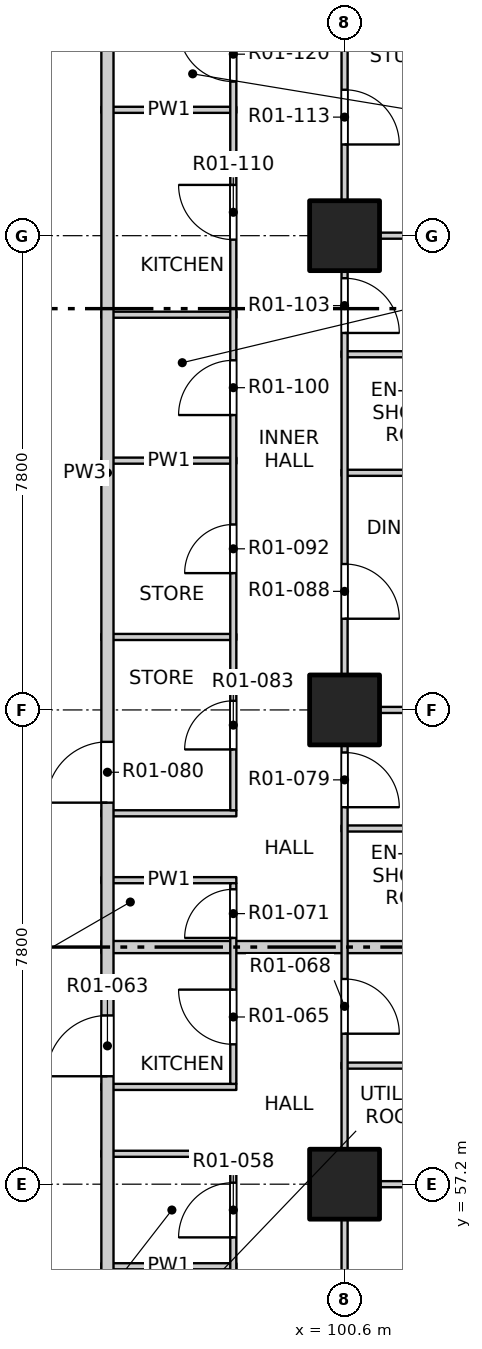
"""IFC4 building model, lengths in metres.
Left out: names, types, materials, properties, quantities, classifications, styles, units other than length and angle.
Written with IfcOpenShell. Run it as: python <this file> out.ifc"""

import sys

from ifc_helpers import new_model, si_unit, direction, frame, frame_2d, origin, origin_2d, place, context, subcontext, project, spatial, rectangle, extrude, element, fill, save


model = new_model("IFC4")
c1 = context("Model", 3, precision=1e-05, world=origin(), true_north=direction((0.0, 1.0)))
c2 = subcontext(c1, "Body", "Model", "MODEL_VIEW")
j1 = project(units=[si_unit("LENGTHUNIT", "METRE"), si_unit("PLANEANGLEUNIT", "RADIAN")], contexts=[c1])
p1 = place(None, origin())
s1 = spatial("IfcSite", under=j1, at=p1, CompositionType="ELEMENT")
p2 = place(p1, origin())
s2 = spatial("IfcBuilding", under=s1, at=p2, CompositionType="ELEMENT")
p3 = place(p2, frame((0.0, 0.0, 19.5)))
s3 = spatial("IfcBuildingStorey", under=s2, at=p3, CompositionType="ELEMENT", Elevation=19.5)
for number, where, z_axis, x_axis in (
    (1, (100.6, 57.2, -0.25), (0.0, 0.0, 1.0), (1.0, 0.0, 0.0)),
    (2, (100.6, 65.0, -0.25), (0.0, 0.0, 1.0), (1.0, 0.0, 0.0)),
    (3, (100.6, 72.8, -0.25), (0.0, 0.0, 1.0), (1.0, 0.0, 0.0)),
):
    element("IfcColumn", number, at=place(p3, frame(where, z_axis=z_axis, x_axis=x_axis)), inside=s3, PredefinedType="COLUMN", context=c2, shape_type="SweptSolid", body=[
        extrude(rectangle(XDim=1.15, YDim=1.15, at=origin_2d()), origin(), (0.0, 0.0, 1.0), 3.4),
    ])
p4 = place(p3, frame((96.6, 55.85, 0.0), z_axis=(0.0, 0.0, 1.0), x_axis=(1.0, 0.0, 0.0)))
e4 = element("IfcWall", 4, at=p4, inside=s3, PredefinedType="PARTITIONING", context=c2, shape_type="SweptSolid", body=[
    extrude(rectangle(XDim=2.22, YDim=0.1, at=frame_2d((1.11, 0.0))), origin(), (0.0, 0.0, 1.0), 3.15),
])
p5 = place(p3, frame((100.55, 57.2, 0.0), z_axis=(0.0, 0.0, 1.0), x_axis=(1.0, 0.0, 0.0)))
e5 = element("IfcWall", 5, at=p5, inside=s3, PredefinedType="PARTITIONING", context=c2, shape_type="SweptSolid", body=[
    extrude(rectangle(XDim=7.55, YDim=0.1, at=frame_2d((3.775, 0.0))), origin(), (0.0, 0.0, 1.0), 2.55),
])
for number, where, z_axis, x_axis in (
    (6, (96.6, 57.7, 0.0), (0.0, 0.0, 1.0), (1.0, 0.0, 0.0)),
    (7, (96.6, 58.8, 0.0), (0.0, 0.0, 1.0), (1.0, 0.0, 0.0)),
):
    element("IfcWall", number, at=place(p3, frame(where, z_axis=z_axis, x_axis=x_axis)), inside=s3, PredefinedType="PARTITIONING", context=c2, shape_type="SweptSolid", body=[
        extrude(rectangle(XDim=2.22, YDim=0.1, at=frame_2d((1.11, 0.0))), origin(), (0.0, 0.0, 1.0), 3.15),
    ])
p6 = place(p3, frame((100.55, 59.15, 0.0), z_axis=(0.0, 0.0, 1.0), x_axis=(1.0, 0.0, 0.0)))
e8 = element("IfcWall", 8, at=p6, inside=s3, PredefinedType="PARTITIONING", context=c2, shape_type="SweptSolid", body=[
    extrude(rectangle(XDim=3.55, YDim=0.1, at=frame_2d((1.775, 0.0))), origin(), (0.0, 0.0, 1.0), 3.15),
])
p7 = place(p3, frame((96.6, 61.1, 0.0), z_axis=(0.0, 0.0, 1.0), x_axis=(1.0, 0.0, 0.0)))
e9 = element("IfcWall", 9, at=p7, inside=s3, PredefinedType="PARTITIONING", context=c2, shape_type="SweptSolid", body=[
    extrude(rectangle(XDim=11.5, YDim=0.2, at=frame_2d((5.75, 0.0))), origin(), (0.0, 0.0, 1.0), 3.15),
])
p8 = place(p3, frame((96.6, 62.2, 0.0), z_axis=(0.0, 0.0, 1.0), x_axis=(1.0, 0.0, 0.0)))
e10 = element("IfcWall", 10, at=p8, inside=s3, PredefinedType="PARTITIONING", context=c2, shape_type="SweptSolid", body=[
    extrude(rectangle(XDim=2.22, YDim=0.1, at=frame_2d((1.11, 0.0))), origin(), (0.0, 0.0, 1.0), 3.15),
])
p9 = place(p3, frame((100.55, 63.05, 0.0), z_axis=(0.0, 0.0, 1.0), x_axis=(1.0, 0.0, 0.0)))
e11 = element("IfcWall", 11, at=p9, inside=s3, PredefinedType="PARTITIONING", context=c2, shape_type="SweptSolid", body=[
    extrude(rectangle(XDim=3.7, YDim=0.1, at=frame_2d((1.85, 0.0))), origin(), (0.0, 0.0, 1.0), 3.15),
])
p10 = place(p3, frame((96.6, 63.3, 0.0), z_axis=(0.0, 0.0, 1.0), x_axis=(1.0, 0.0, 0.0)))
e12 = element("IfcWall", 12, at=p10, inside=s3, PredefinedType="PARTITIONING", context=c2, shape_type="SweptSolid", body=[
    extrude(rectangle(XDim=2.22, YDim=0.1, at=frame_2d((1.11, 0.0))), origin(), (0.0, 0.0, 1.0), 3.15),
])
p11 = place(p3, frame((100.55, 65.0, 0.0), z_axis=(0.0, 0.0, 1.0), x_axis=(1.0, 0.0, 0.0)))
e13 = element("IfcWall", 13, at=p11, inside=s3, PredefinedType="PARTITIONING", context=c2, shape_type="SweptSolid", body=[
    extrude(rectangle(XDim=7.55, YDim=0.1, at=frame_2d((3.775, 0.0))), origin(), (0.0, 0.0, 1.0), 2.55),
])
p12 = place(p3, frame((96.6, 66.2, 0.0), z_axis=(0.0, 0.0, 1.0), x_axis=(1.0, 0.0, 0.0)))
e14 = element("IfcWall", 14, at=p12, inside=s3, PredefinedType="PARTITIONING", context=c2, shape_type="SweptSolid", body=[
    extrude(rectangle(XDim=2.22, YDim=0.1, at=frame_2d((1.11, 0.0))), origin(), (0.0, 0.0, 1.0), 3.15),
])
p13 = place(p3, frame((100.55, 68.9, 0.0), z_axis=(0.0, 0.0, 1.0), x_axis=(1.0, 0.0, 0.0)))
e15 = element("IfcWall", 15, at=p13, inside=s3, PredefinedType="PARTITIONING", context=c2, shape_type="SweptSolid", body=[
    extrude(rectangle(XDim=7.55, YDim=0.1, at=frame_2d((3.775, 0.0))), origin(), (0.0, 0.0, 1.0), 3.15),
])
p14 = place(p3, frame((96.6, 69.1, 0.0), z_axis=(0.0, 0.0, 1.0), x_axis=(1.0, 0.0, 0.0)))
e16 = element("IfcWall", 16, at=p14, inside=s3, PredefinedType="PARTITIONING", context=c2, shape_type="SweptSolid", body=[
    extrude(rectangle(XDim=2.22, YDim=0.1, at=frame_2d((1.11, 0.0))), origin(), (0.0, 0.0, 1.0), 3.15),
])
p15 = place(p3, frame((100.55, 70.85, 0.0), z_axis=(0.0, 0.0, 1.0), x_axis=(1.0, 0.0, 0.0)))
e17 = element("IfcWall", 17, at=p15, inside=s3, PredefinedType="PARTITIONING", context=c2, shape_type="SweptSolid", body=[
    extrude(rectangle(XDim=3.7, YDim=0.1, at=frame_2d((1.85, 0.0))), origin(), (0.0, 0.0, 1.0), 3.15),
])
p16 = place(p3, frame((96.6, 71.5, 0.0), z_axis=(0.0, 0.0, 1.0), x_axis=(1.0, 0.0, 0.0)))
e18 = element("IfcWall", 18, at=p16, inside=s3, PredefinedType="PARTITIONING", context=c2, shape_type="SweptSolid", body=[
    extrude(rectangle(XDim=2.22, YDim=0.1, at=frame_2d((1.11, 0.0))), origin(), (0.0, 0.0, 1.0), 3.15),
])
p17 = place(p3, frame((100.55, 72.8, 0.0), z_axis=(0.0, 0.0, 1.0), x_axis=(1.0, 0.0, 0.0)))
e19 = element("IfcWall", 19, at=p17, inside=s3, PredefinedType="PARTITIONING", context=c2, shape_type="SweptSolid", body=[
    extrude(rectangle(XDim=7.55, YDim=0.1, at=frame_2d((3.775, 0.0))), origin(), (0.0, 0.0, 1.0), 2.55),
])
p18 = place(p3, frame((96.6, 74.87, 0.0), z_axis=(0.0, 0.0, 1.0), x_axis=(1.0, 0.0, 0.0)))
e20 = element("IfcWall", 20, at=p18, inside=s3, PredefinedType="PARTITIONING", context=c2, shape_type="SweptSolid", body=[
    extrude(rectangle(XDim=2.22, YDim=0.1, at=frame_2d((1.11, 0.0))), origin(), (0.0, 0.0, 1.0), 3.15),
])
p19 = place(p3, frame((96.7, 53.4, 0.0), z_axis=(0.0, 0.0, 1.0), x_axis=(0.0, 1.0, 0.0)))
e21 = element("IfcWall", 21, at=p19, inside=s3, PredefinedType="PARTITIONING", context=c2, shape_type="SweptSolid", body=[
    extrude(rectangle(XDim=31.0, YDim=0.2, at=frame_2d((15.5, 0.0))), origin(), (0.0, 0.0, 1.0), 3.15),
])
p20 = place(p19, frame((5.575, 0.0, 0.0)))
e22 = element("IfcOpeningElement", 22, at=p20, cuts=e21, PredefinedType="OPENING", context=c2, shape_type="SweptSolid", body=[
    extrude(rectangle(XDim=1.0, YDim=2.1, at=frame_2d((0.5, 1.05))), frame((0.0, 0.11, 0.0), z_axis=(0.0, -1.0, 0.0), x_axis=(1.0, 0.0, 0.0)), (0.0, 0.0, 1.0), 0.22),
])
p21 = place(p19, frame((10.075, 0.0, 0.0)))
e23 = element("IfcOpeningElement", 23, at=p21, cuts=e21, PredefinedType="OPENING", context=c2, shape_type="SweptSolid", body=[
    extrude(rectangle(XDim=1.0, YDim=2.1, at=frame_2d((0.5, 1.05))), frame((0.0, 0.11, 0.0), z_axis=(0.0, -1.0, 0.0), x_axis=(1.0, 0.0, 0.0)), (0.0, 0.0, 1.0), 0.22),
])
p22 = place(p19, frame((28.975, 0.0, 0.0)))
e24 = element("IfcOpeningElement", 24, at=p22, cuts=e21, PredefinedType="OPENING", context=c2, shape_type="SweptSolid", body=[
    extrude(rectangle(XDim=1.0, YDim=2.1, at=frame_2d((0.5, 1.05))), frame((0.0, 0.11, 0.0), z_axis=(0.0, -1.0, 0.0), x_axis=(1.0, 0.0, 0.0)), (0.0, 0.0, 1.0), 0.22),
])
p23 = place(p3, frame((98.77, 45.55, 0.0), z_axis=(0.0, 0.0, 1.0), x_axis=(0.0, 1.0, 0.0)))
e25 = element("IfcWall", 25, at=p23, inside=s3, PredefinedType="PARTITIONING", context=c2, shape_type="SweptSolid", body=[
    extrude(rectangle(XDim=12.1, YDim=0.1, at=frame_2d((6.05, 0.0))), origin(), (0.0, 0.0, 1.0), 3.15),
])
p24 = place(p23, frame((0.7, 0.0, 0.0)))
e26 = element("IfcOpeningElement", 26, at=p24, cuts=e25, PredefinedType="OPENING", context=c2, shape_type="SweptSolid", body=[
    extrude(rectangle(XDim=0.9, YDim=2.1, at=frame_2d((0.45, 1.05))), frame((0.0, 0.06, 0.0), z_axis=(0.0, -1.0, 0.0), x_axis=(1.0, 0.0, 0.0)), (0.0, 0.0, 1.0), 0.12),
])
p25 = place(p23, frame((3.325, 0.0, 0.0)))
e27 = element("IfcOpeningElement", 27, at=p25, cuts=e25, PredefinedType="OPENING", context=c2, shape_type="SweptSolid", body=[
    extrude(rectangle(XDim=0.8, YDim=2.1, at=frame_2d((0.4, 1.05))), frame((0.0, 0.06, 0.0), z_axis=(0.0, -1.0, 0.0), x_axis=(1.0, 0.0, 0.0)), (0.0, 0.0, 1.0), 0.12),
])
p26 = place(p23, frame((6.15, 0.0, 0.0)))
e28 = element("IfcOpeningElement", 28, at=p26, cuts=e25, PredefinedType="OPENING", context=c2, shape_type="SweptSolid", body=[
    extrude(rectangle(XDim=0.8, YDim=2.1, at=frame_2d((0.4, 1.05))), frame((0.0, 0.06, 0.0), z_axis=(0.0, -1.0, 0.0), x_axis=(1.0, 0.0, 0.0)), (0.0, 0.0, 1.0), 0.12),
])
p27 = place(p23, frame((8.75, 0.0, 0.0)))
e29 = element("IfcOpeningElement", 29, at=p27, cuts=e25, PredefinedType="OPENING", context=c2, shape_type="SweptSolid", body=[
    extrude(rectangle(XDim=0.8, YDim=2.1, at=frame_2d((0.4, 1.05))), frame((0.0, 0.06, 0.0), z_axis=(0.0, -1.0, 0.0), x_axis=(1.0, 0.0, 0.0)), (0.0, 0.0, 1.0), 0.12),
])
p28 = place(p23, frame((10.775, 0.0, 0.0)))
e30 = element("IfcOpeningElement", 30, at=p28, cuts=e25, PredefinedType="OPENING", context=c2, shape_type="SweptSolid", body=[
    extrude(rectangle(XDim=0.9, YDim=2.1, at=frame_2d((0.45, 1.05))), frame((0.0, 0.06, 0.0), z_axis=(0.0, -1.0, 0.0), x_axis=(1.0, 0.0, 0.0)), (0.0, 0.0, 1.0), 0.12),
])
p29 = place(p3, frame((98.77, 58.85, 0.0), z_axis=(0.0, 0.0, 1.0), x_axis=(0.0, 1.0, 0.0)))
e31 = element("IfcWall", 31, at=p29, inside=s3, PredefinedType="PARTITIONING", context=c2, shape_type="SweptSolid", body=[
    extrude(rectangle(XDim=3.3, YDim=0.1, at=frame_2d((1.65, 0.0))), origin(), (0.0, 0.0, 1.0), 3.15),
])
p30 = place(p29, frame((0.65, 0.0, 0.0)))
e32 = element("IfcOpeningElement", 32, at=p30, cuts=e31, PredefinedType="OPENING", context=c2, shape_type="SweptSolid", body=[
    extrude(rectangle(XDim=0.9, YDim=2.1, at=frame_2d((0.45, 1.05))), frame((0.0, 0.06, 0.0), z_axis=(0.0, -1.0, 0.0), x_axis=(1.0, 0.0, 0.0)), (0.0, 0.0, 1.0), 0.12),
])
p31 = place(p29, frame((2.4, 0.0, 0.0)))
e33 = element("IfcOpeningElement", 33, at=p31, cuts=e31, PredefinedType="OPENING", context=c2, shape_type="SweptSolid", body=[
    extrude(rectangle(XDim=0.8, YDim=2.1, at=frame_2d((0.4, 1.05))), frame((0.0, 0.06, 0.0), z_axis=(0.0, -1.0, 0.0), x_axis=(1.0, 0.0, 0.0)), (0.0, 0.0, 1.0), 0.12),
])
p32 = place(p3, frame((98.77, 63.35, 0.0), z_axis=(0.0, 0.0, 1.0), x_axis=(0.0, 1.0, 0.0)))
e34 = element("IfcWall", 34, at=p32, inside=s3, PredefinedType="PARTITIONING", context=c2, shape_type="SweptSolid", body=[
    extrude(rectangle(XDim=17.7, YDim=0.1, at=frame_2d((8.85, 0.0))), origin(), (0.0, 0.0, 1.0), 3.15),
])
p33 = place(p32, frame((1.0, 0.0, 0.0)))
e35 = element("IfcOpeningElement", 35, at=p33, cuts=e34, PredefinedType="OPENING", context=c2, shape_type="SweptSolid", body=[
    extrude(rectangle(XDim=0.8, YDim=2.1, at=frame_2d((0.4, 1.05))), frame((0.0, 0.06, 0.0), z_axis=(0.0, -1.0, 0.0), x_axis=(1.0, 0.0, 0.0)), (0.0, 0.0, 1.0), 0.12),
])
p34 = place(p32, frame((3.9, 0.0, 0.0)))
e36 = element("IfcOpeningElement", 36, at=p34, cuts=e34, PredefinedType="OPENING", context=c2, shape_type="SweptSolid", body=[
    extrude(rectangle(XDim=0.8, YDim=2.1, at=frame_2d((0.4, 1.05))), frame((0.0, 0.06, 0.0), z_axis=(0.0, -1.0, 0.0), x_axis=(1.0, 0.0, 0.0)), (0.0, 0.0, 1.0), 0.12),
])
p35 = place(p32, frame((6.5, 0.0, 0.0)))
e37 = element("IfcOpeningElement", 37, at=p35, cuts=e34, PredefinedType="OPENING", context=c2, shape_type="SweptSolid", body=[
    extrude(rectangle(XDim=0.9, YDim=2.1, at=frame_2d((0.45, 1.05))), frame((0.0, 0.06, 0.0), z_axis=(0.0, -1.0, 0.0), x_axis=(1.0, 0.0, 0.0)), (0.0, 0.0, 1.0), 0.12),
])
p36 = place(p32, frame((9.385, 0.0, 0.0)))
e38 = element("IfcOpeningElement", 38, at=p36, cuts=e34, PredefinedType="OPENING", context=c2, shape_type="SweptSolid", body=[
    extrude(rectangle(XDim=0.9, YDim=2.1, at=frame_2d((0.45, 1.05))), frame((0.0, 0.06, 0.0), z_axis=(0.0, -1.0, 0.0), x_axis=(1.0, 0.0, 0.0)), (0.0, 0.0, 1.0), 0.12),
])
p37 = place(p32, frame((11.985, 0.0, 0.0)))
e39 = element("IfcOpeningElement", 39, at=p37, cuts=e34, PredefinedType="OPENING", context=c2, shape_type="SweptSolid", body=[
    extrude(rectangle(XDim=0.9, YDim=2.1, at=frame_2d((0.45, 1.05))), frame((0.0, 0.06, 0.0), z_axis=(0.0, -1.0, 0.0), x_axis=(1.0, 0.0, 0.0)), (0.0, 0.0, 1.0), 0.12),
])
p38 = place(p32, frame((14.025, 0.0, 0.0)))
e40 = element("IfcOpeningElement", 40, at=p38, cuts=e34, PredefinedType="OPENING", context=c2, shape_type="SweptSolid", body=[
    extrude(rectangle(XDim=0.8, YDim=2.1, at=frame_2d((0.4, 1.05))), frame((0.0, 0.06, 0.0), z_axis=(0.0, -1.0, 0.0), x_axis=(1.0, 0.0, 0.0)), (0.0, 0.0, 1.0), 0.12),
])
p39 = place(p32, frame((16.175, 0.0, 0.0)))
e41 = element("IfcOpeningElement", 41, at=p39, cuts=e34, PredefinedType="OPENING", context=c2, shape_type="SweptSolid", body=[
    extrude(rectangle(XDim=0.9, YDim=2.1, at=frame_2d((0.45, 1.05))), frame((0.0, 0.06, 0.0), z_axis=(0.0, -1.0, 0.0), x_axis=(1.0, 0.0, 0.0)), (0.0, 0.0, 1.0), 0.12),
])
p40 = place(p3, frame((100.6, 49.4, 0.0), z_axis=(0.0, 0.0, 1.0), x_axis=(0.0, 1.0, 0.0)))
e42 = element("IfcWall", 42, at=p40, inside=s3, PredefinedType="PARTITIONING", context=c2, shape_type="SweptSolid", body=[
    extrude(rectangle(XDim=31.2, YDim=0.1, at=frame_2d((15.6, 0.0))), origin(), (0.0, 0.0, 1.0), 3.15),
])
p41 = place(p40, frame((1.5, 0.0, 0.0)))
e43 = element("IfcOpeningElement", 43, at=p41, cuts=e42, PredefinedType="OPENING", context=c2, shape_type="SweptSolid", body=[
    extrude(rectangle(XDim=0.9, YDim=2.1, at=frame_2d((0.45, 1.05))), frame((0.0, 0.06, 0.0), z_axis=(0.0, -1.0, 0.0), x_axis=(1.0, 0.0, 0.0)), (0.0, 0.0, 1.0), 0.12),
])
p42 = place(p40, frame((5.4, 0.0, 0.0)))
e44 = element("IfcOpeningElement", 44, at=p42, cuts=e42, PredefinedType="OPENING", context=c2, shape_type="SweptSolid", body=[
    extrude(rectangle(XDim=0.9, YDim=2.1, at=frame_2d((0.45, 1.05))), frame((0.0, 0.06, 0.0), z_axis=(0.0, -1.0, 0.0), x_axis=(1.0, 0.0, 0.0)), (0.0, 0.0, 1.0), 0.12),
])
p43 = place(p40, frame((10.275, 0.0, 0.0)))
e45 = element("IfcOpeningElement", 45, at=p43, cuts=e42, PredefinedType="OPENING", context=c2, shape_type="SweptSolid", body=[
    extrude(rectangle(XDim=0.9, YDim=2.1, at=frame_2d((0.45, 1.05))), frame((0.0, 0.06, 0.0), z_axis=(0.0, -1.0, 0.0), x_axis=(1.0, 0.0, 0.0)), (0.0, 0.0, 1.0), 0.12),
])
p44 = place(p40, frame((14.0, 0.0, 0.0)))
e46 = element("IfcOpeningElement", 46, at=p44, cuts=e42, PredefinedType="OPENING", context=c2, shape_type="SweptSolid", body=[
    extrude(rectangle(XDim=0.9, YDim=2.1, at=frame_2d((0.45, 1.05))), frame((0.0, 0.06, 0.0), z_axis=(0.0, -1.0, 0.0), x_axis=(1.0, 0.0, 0.0)), (0.0, 0.0, 1.0), 0.12),
])
p45 = place(p40, frame((17.1, 0.0, 0.0)))
e47 = element("IfcOpeningElement", 47, at=p45, cuts=e42, PredefinedType="OPENING", context=c2, shape_type="SweptSolid", body=[
    extrude(rectangle(XDim=0.9, YDim=2.1, at=frame_2d((0.45, 1.05))), frame((0.0, 0.06, 0.0), z_axis=(0.0, -1.0, 0.0), x_axis=(1.0, 0.0, 0.0)), (0.0, 0.0, 1.0), 0.12),
])
p46 = place(p40, frame((21.8, 0.0, 0.0)))
e48 = element("IfcOpeningElement", 48, at=p46, cuts=e42, PredefinedType="OPENING", context=c2, shape_type="SweptSolid", body=[
    extrude(rectangle(XDim=0.9, YDim=2.1, at=frame_2d((0.45, 1.05))), frame((0.0, 0.06, 0.0), z_axis=(0.0, -1.0, 0.0), x_axis=(1.0, 0.0, 0.0)), (0.0, 0.0, 1.0), 0.12),
])
p47 = place(p40, frame((24.9, 0.0, 0.0)))
e49 = element("IfcOpeningElement", 49, at=p47, cuts=e42, PredefinedType="OPENING", context=c2, shape_type="SweptSolid", body=[
    extrude(rectangle(XDim=0.9, YDim=2.1, at=frame_2d((0.45, 1.05))), frame((0.0, 0.06, 0.0), z_axis=(0.0, -1.0, 0.0), x_axis=(1.0, 0.0, 0.0)), (0.0, 0.0, 1.0), 0.12),
])
p48 = place(p40, frame((28.8, 0.0, 0.0)))
e50 = element("IfcOpeningElement", 50, at=p48, cuts=e42, PredefinedType="OPENING", context=c2, shape_type="SweptSolid", body=[
    extrude(rectangle(XDim=0.9, YDim=2.1, at=frame_2d((0.45, 1.05))), frame((0.0, 0.06, 0.0), z_axis=(0.0, -1.0, 0.0), x_axis=(1.0, 0.0, 0.0)), (0.0, 0.0, 1.0), 0.12),
])
p49 = place(p28, origin())
e51 = element("IfcDoor", 51, at=p49, inside=s3, OperationType="SINGLE_SWING_LEFT", PredefinedType="DOOR", context=c2, shape_type="SweptSolid", body=[
    extrude(rectangle(XDim=0.9, YDim=2.1, at=frame_2d((0.45, 1.05))), frame((0.0, 0.025, 0.0), z_axis=(0.0, -1.0, 0.0), x_axis=(1.0, 0.0, 0.0)), (0.0, 0.0, 1.0), 0.05),
])
fill(e30, e51)
p50 = place(p20, origin())
e52 = element("IfcDoor", 52, at=p50, inside=s3, OperationType="SINGLE_SWING_LEFT", PredefinedType="DOOR", context=c2, shape_type="SweptSolid", body=[
    extrude(rectangle(XDim=1.0, YDim=2.1, at=frame_2d((0.5, 1.05))), frame((0.0, 0.025, 0.0), z_axis=(0.0, -1.0, 0.0), x_axis=(1.0, 0.0, 0.0)), (0.0, 0.0, 1.0), 0.05),
])
fill(e22, e52)
p51 = place(p30, origin())
e53 = element("IfcDoor", 53, at=p51, inside=s3, OperationType="SINGLE_SWING_RIGHT", PredefinedType="DOOR", context=c2, shape_type="SweptSolid", body=[
    extrude(rectangle(XDim=0.9, YDim=2.1, at=frame_2d((0.45, 1.05))), frame((0.0, 0.025, 0.0), z_axis=(0.0, -1.0, 0.0), x_axis=(1.0, 0.0, 0.0)), (0.0, 0.0, 1.0), 0.05),
])
fill(e32, e53)
p52 = place(p43, origin())
e54 = element("IfcDoor", 54, at=p52, inside=s3, OperationType="SINGLE_SWING_RIGHT", PredefinedType="DOOR", context=c2, shape_type="SweptSolid", body=[
    extrude(rectangle(XDim=0.9, YDim=2.1, at=frame_2d((0.45, 1.05))), frame((0.0, 0.025, 0.0), z_axis=(0.0, -1.0, 0.0), x_axis=(1.0, 0.0, 0.0)), (0.0, 0.0, 1.0), 0.05),
])
fill(e45, e54)
p53 = place(p31, origin())
e55 = element("IfcDoor", 55, at=p53, inside=s3, OperationType="SINGLE_SWING_LEFT", PredefinedType="DOOR", context=c2, shape_type="SweptSolid", body=[
    extrude(rectangle(XDim=0.8, YDim=2.1, at=frame_2d((0.4, 1.05))), frame((0.0, 0.025, 0.0), z_axis=(0.0, -1.0, 0.0), x_axis=(1.0, 0.0, 0.0)), (0.0, 0.0, 1.0), 0.05),
])
fill(e33, e55)
p54 = place(p44, origin())
e56 = element("IfcDoor", 56, at=p54, inside=s3, OperationType="SINGLE_SWING_RIGHT", PredefinedType="DOOR", context=c2, shape_type="SweptSolid", body=[
    extrude(rectangle(XDim=0.9, YDim=2.1, at=frame_2d((0.45, 1.05))), frame((0.0, 0.025, 0.0), z_axis=(0.0, -1.0, 0.0), x_axis=(1.0, 0.0, 0.0)), (0.0, 0.0, 1.0), 0.05),
])
fill(e46, e56)
p55 = place(p21, origin())
e57 = element("IfcDoor", 57, at=p55, inside=s3, OperationType="SINGLE_SWING_LEFT", PredefinedType="DOOR", context=c2, shape_type="SweptSolid", body=[
    extrude(rectangle(XDim=1.0, YDim=2.1, at=frame_2d((0.5, 1.05))), frame((0.0, 0.025, 0.0), z_axis=(0.0, -1.0, 0.0), x_axis=(1.0, 0.0, 0.0)), (0.0, 0.0, 1.0), 0.05),
])
fill(e23, e57)
p56 = place(p33, origin())
e58 = element("IfcDoor", 58, at=p56, inside=s3, OperationType="SINGLE_SWING_LEFT", PredefinedType="DOOR", context=c2, shape_type="SweptSolid", body=[
    extrude(rectangle(XDim=0.8, YDim=2.1, at=frame_2d((0.4, 1.05))), frame((0.0, 0.025, 0.0), z_axis=(0.0, -1.0, 0.0), x_axis=(1.0, 0.0, 0.0)), (0.0, 0.0, 1.0), 0.05),
])
fill(e35, e58)
p57 = place(p45, origin())
e59 = element("IfcDoor", 59, at=p57, inside=s3, OperationType="SINGLE_SWING_RIGHT", PredefinedType="DOOR", context=c2, shape_type="SweptSolid", body=[
    extrude(rectangle(XDim=0.9, YDim=2.1, at=frame_2d((0.45, 1.05))), frame((0.0, 0.025, 0.0), z_axis=(0.0, -1.0, 0.0), x_axis=(1.0, 0.0, 0.0)), (0.0, 0.0, 1.0), 0.05),
])
fill(e47, e59)
p58 = place(p34, origin())
e60 = element("IfcDoor", 60, at=p58, inside=s3, OperationType="SINGLE_SWING_LEFT", PredefinedType="DOOR", context=c2, shape_type="SweptSolid", body=[
    extrude(rectangle(XDim=0.8, YDim=2.1, at=frame_2d((0.4, 1.05))), frame((0.0, 0.025, 0.0), z_axis=(0.0, -1.0, 0.0), x_axis=(1.0, 0.0, 0.0)), (0.0, 0.0, 1.0), 0.05),
])
fill(e36, e60)
p59 = place(p35, origin())
e61 = element("IfcDoor", 61, at=p59, inside=s3, OperationType="SINGLE_SWING_LEFT", PredefinedType="DOOR", context=c2, shape_type="SweptSolid", body=[
    extrude(rectangle(XDim=0.9, YDim=2.1, at=frame_2d((0.45, 1.05))), frame((0.0, 0.025, 0.0), z_axis=(0.0, -1.0, 0.0), x_axis=(1.0, 0.0, 0.0)), (0.0, 0.0, 1.0), 0.05),
])
fill(e37, e61)
p60 = place(p46, origin())
e62 = element("IfcDoor", 62, at=p60, inside=s3, OperationType="SINGLE_SWING_RIGHT", PredefinedType="DOOR", context=c2, shape_type="SweptSolid", body=[
    extrude(rectangle(XDim=0.9, YDim=2.1, at=frame_2d((0.45, 1.05))), frame((0.0, 0.025, 0.0), z_axis=(0.0, -1.0, 0.0), x_axis=(1.0, 0.0, 0.0)), (0.0, 0.0, 1.0), 0.05),
])
fill(e48, e62)
p61 = place(p36, origin())
e63 = element("IfcDoor", 63, at=p61, inside=s3, OperationType="SINGLE_SWING_RIGHT", PredefinedType="DOOR", context=c2, shape_type="SweptSolid", body=[
    extrude(rectangle(XDim=0.9, YDim=2.1, at=frame_2d((0.45, 1.05))), frame((0.0, 0.025, 0.0), z_axis=(0.0, -1.0, 0.0), x_axis=(1.0, 0.0, 0.0)), (0.0, 0.0, 1.0), 0.05),
])
fill(e38, e63)
p62 = place(p47, origin())
e64 = element("IfcDoor", 64, at=p62, inside=s3, OperationType="SINGLE_SWING_RIGHT", PredefinedType="DOOR", context=c2, shape_type="SweptSolid", body=[
    extrude(rectangle(XDim=0.9, YDim=2.1, at=frame_2d((0.45, 1.05))), frame((0.0, 0.025, 0.0), z_axis=(0.0, -1.0, 0.0), x_axis=(1.0, 0.0, 0.0)), (0.0, 0.0, 1.0), 0.05),
])
fill(e49, e64)
p63 = place(p37, origin())
e65 = element("IfcDoor", 65, at=p63, inside=s3, OperationType="SINGLE_SWING_RIGHT", PredefinedType="DOOR", context=c2, shape_type="SweptSolid", body=[
    extrude(rectangle(XDim=0.9, YDim=2.1, at=frame_2d((0.45, 1.05))), frame((0.0, 0.025, 0.0), z_axis=(0.0, -1.0, 0.0), x_axis=(1.0, 0.0, 0.0)), (0.0, 0.0, 1.0), 0.05),
])
fill(e39, e65)
save(model, sys.argv[1])
